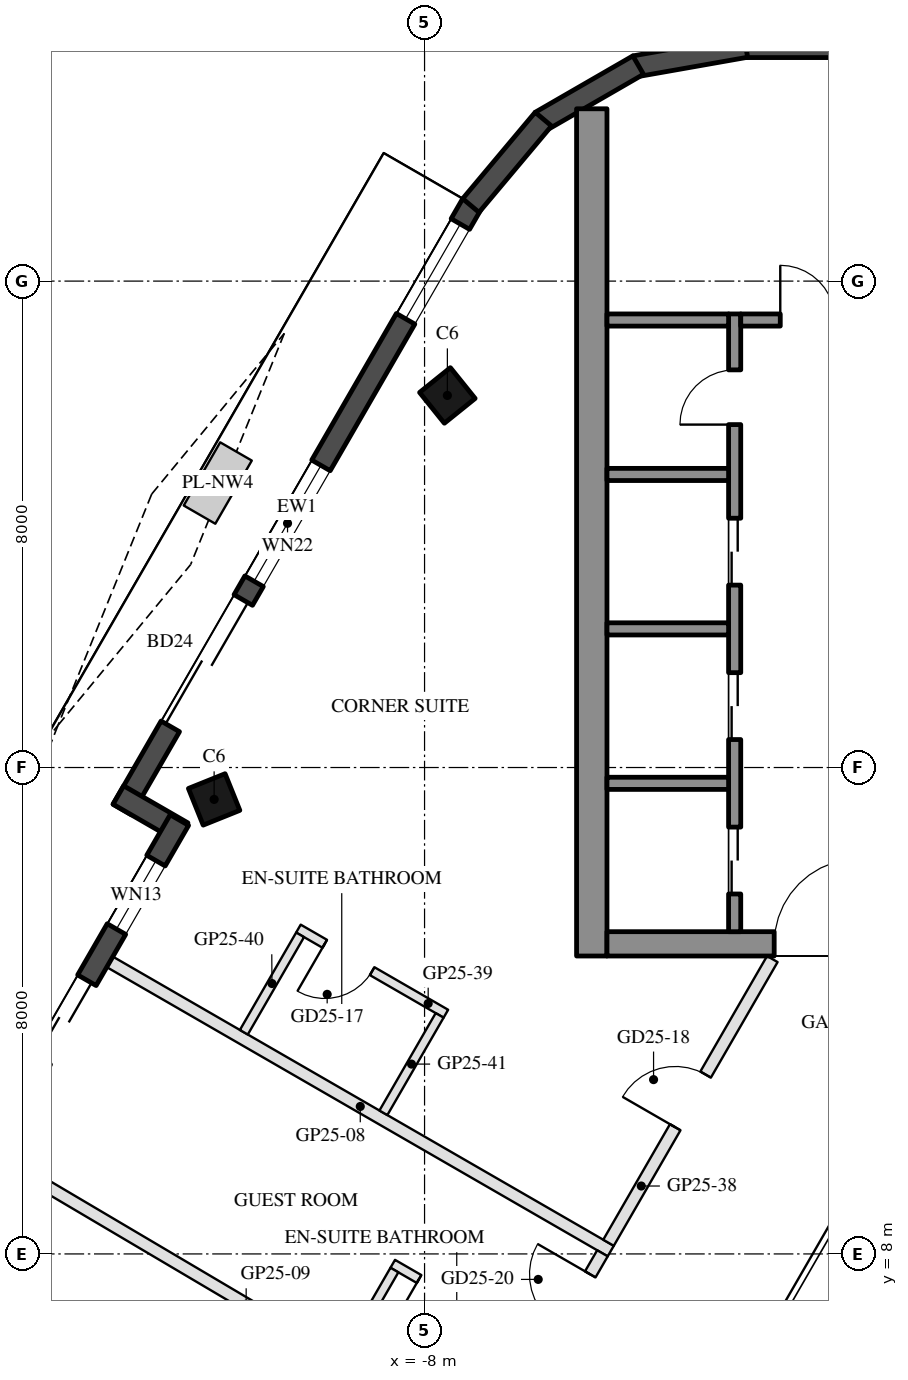
"""IFC4 building model, lengths in metres.
Left out: names, types, materials, properties, quantities, classifications, styles, units other than length and angle.
Written with IfcOpenShell. Run it as: python <this file> out.ifc"""

import sys

from ifc_helpers import new_model, si_unit, direction, frame, frame_2d, origin, origin_2d, place, context, subcontext, project, spatial, rectangle, hollow_rectangle, extrude, boolean, halfspace, element, fill, save


model = new_model("IFC4")
c1 = context("Model", 3, precision=1e-05, world=origin(), true_north=direction((0.0, 1.0)))
c2 = subcontext(c1, "Body", "Model", "MODEL_VIEW")
j1 = project(units=[si_unit("LENGTHUNIT", "METRE"), si_unit("PLANEANGLEUNIT", "RADIAN")], contexts=[c1])
p1 = place(None, origin())
s1 = spatial("IfcSite", under=j1, at=p1, CompositionType="ELEMENT")
p2 = place(p1, origin())
s2 = spatial("IfcBuilding", under=s1, at=p2, CompositionType="ELEMENT")
p3 = place(p2, frame((0.0, 0.0, 265.2)))
s3 = spatial("IfcBuildingStorey", under=s2, at=p3, CompositionType="ELEMENT", Elevation=265.2)
p4 = place(p3, frame((-7.625, 22.119, 0.0), z_axis=(0.069728397733, -0.180050765176, 0.981182792608), x_axis=(0.504246941598, 0.855030910201, 0.121066776982)))
e1 = element("IfcColumn", 1, at=p4, inside=s3, PredefinedType="COLUMN", context=c2, shape_type="SweptSolid", body=[
    boolean("DIFFERENCE", boolean("DIFFERENCE", extrude(hollow_rectangle(XDim=0.65, YDim=0.65, WallThickness=0.03, at=origin_2d()), origin(), (0.0, 0.0, 1.0), 3.771), halfspace(frame((0.0, 0.0, 0.047), z_axis=(0.0, 0.0, 1.0), x_axis=(1.0, 0.0, 0.0)), True)), halfspace(frame((0.0, 0.0, 3.724), z_axis=(0.0, 0.0, 1.0), x_axis=(1.0, 0.0, 0.0)), False)),
])
p5 = place(p3, frame((-11.461, 15.475, 0.0), z_axis=(0.100582464937, -0.128315882454, 0.986619583252), x_axis=(0.502859866582, 0.862221844537, 0.060872369628)))
e2 = element("IfcColumn", 2, at=p5, inside=s3, PredefinedType="COLUMN", context=c2, shape_type="SweptSolid", body=[
    boolean("DIFFERENCE", boolean("DIFFERENCE", extrude(hollow_rectangle(XDim=0.65, YDim=0.65, WallThickness=0.03, at=origin_2d()), origin(), (0.0, 0.0, 1.0), 3.75), halfspace(frame((0.0, 0.0, 0.04), z_axis=(0.0, 0.0, 1.0), x_axis=(1.0, 0.0, 0.0)), True)), halfspace(frame((0.0, 0.0, 3.71), z_axis=(0.0, 0.0, 1.0), x_axis=(1.0, 0.0, 0.0)), False)),
])
p6 = place(p3, frame((-7.221, 25.268, 0.0), z_axis=(0.0, 0.0, 1.0), x_axis=(-0.499999932627, -0.866025442683, 0.0)))
e3 = element("IfcWall", 3, at=p6, inside=s3, PredefinedType="SOLIDWALL", context=c2, shape_type="SweptSolid", body=[
    extrude(rectangle(XDim=11.5, YDim=0.35, at=frame_2d((5.75, 0.0))), origin(), (0.0, 0.0, 1.0), 3.55),
])
p7 = place(p6, frame((0.381, 0.0, 0.3)))
e4 = element("IfcOpeningElement", 4, at=p7, cuts=e3, PredefinedType="OPENING", context=c2, shape_type="SweptSolid", body=[
    extrude(rectangle(XDim=1.8, YDim=2.65, at=frame_2d((0.9, 1.325))), frame((0.0, 0.185, 0.0), z_axis=(0.0, -1.0, 0.0), x_axis=(1.0, 0.0, 0.0)), (0.0, 0.0, 1.0), 0.37),
])
p8 = place(p6, frame((7.521, 0.0, 0.0)))
e5 = element("IfcOpeningElement", 5, at=p8, cuts=e3, PredefinedType="OPENING", context=c2, shape_type="SweptSolid", body=[
    extrude(rectangle(XDim=2.4, YDim=2.4, at=frame_2d((1.2, 1.2))), frame((0.0, 0.185, 0.0), z_axis=(0.0, -1.0, 0.0), x_axis=(1.0, 0.0, 0.0)), (0.0, 0.0, 1.0), 0.37),
])
p9 = place(p6, frame((4.964, 0.0, 0.3)))
e6 = element("IfcOpeningElement", 6, at=p9, cuts=e3, PredefinedType="OPENING", context=c2, shape_type="SweptSolid", body=[
    extrude(rectangle(XDim=2.2, YDim=2.65, at=frame_2d((1.1, 1.325))), frame((0.0, 0.185, 0.0), z_axis=(0.0, -1.0, 0.0), x_axis=(1.0, 0.0, 0.0)), (0.0, 0.0, 1.0), 0.37),
])
p10 = place(p3, frame((-13.036, 15.548, 0.0), z_axis=(0.0, 0.0, 1.0), x_axis=(0.866005645448, -0.500034220881, 0.0)))
e7 = element("IfcWall", 7, at=p10, inside=s3, PredefinedType="SOLIDWALL", context=c2, shape_type="SweptSolid", body=[
    extrude(rectangle(XDim=1.22, YDim=0.35, at=frame_2d((0.61, 0.0))), origin(), (0.0, 0.0, 1.0), 3.55),
])
p11 = place(p3, frame((-12.032, 15.136, 0.0), z_axis=(0.0, 0.0, 1.0), x_axis=(-0.500005870429, -0.866022014464, 0.0)))
e8 = element("IfcWall", 8, at=p11, inside=s3, PredefinedType="SOLIDWALL", context=c2, shape_type="SweptSolid", body=[
    extrude(rectangle(XDim=6.512, YDim=0.35, at=frame_2d((3.256, 0.0))), origin(), (0.0, 0.0, 1.0), 3.55),
])
p12 = place(p11, frame((0.77, 0.0, 0.3)))
e9 = element("IfcOpeningElement", 9, at=p12, cuts=e8, PredefinedType="OPENING", context=c2, shape_type="SweptSolid", body=[
    extrude(rectangle(XDim=1.3, YDim=2.65, at=frame_2d((0.65, 1.325))), frame((0.0, 0.185, 0.0), z_axis=(0.0, -1.0, 0.0), x_axis=(1.0, 0.0, 0.0)), (0.0, 0.0, 1.0), 0.37),
])
p13 = place(p11, frame((3.042, 0.0, 0.0)))
e10 = element("IfcOpeningElement", 10, at=p13, cuts=e8, PredefinedType="OPENING", context=c2, shape_type="SweptSolid", body=[
    extrude(rectangle(XDim=1.5, YDim=2.4, at=frame_2d((0.75, 1.2))), frame((0.0, 0.185, 0.0), z_axis=(0.0, -1.0, 0.0), x_axis=(1.0, 0.0, 0.0)), (0.0, 0.0, 1.0), 0.37),
])
p14 = place(p11, frame((4.842, 0.0, 0.3)))
e11 = element("IfcOpeningElement", 11, at=p14, cuts=e8, PredefinedType="OPENING", context=c2, shape_type="SweptSolid", body=[
    extrude(rectangle(XDim=1.0, YDim=2.65, at=frame_2d((0.5, 1.325))), frame((0.0, 0.185, 0.0), z_axis=(0.0, -1.0, 0.0), x_axis=(1.0, 0.0, 0.0)), (0.0, 0.0, 1.0), 0.37),
])
p15 = place(p3, frame((2.747, 27.851, 0.0), z_axis=(0.0, 0.0, 1.0), x_axis=(-1.0, 0.0, 0.0)))
e12 = element("IfcWall", 12, at=p15, inside=s3, PredefinedType="SOLIDWALL", context=c2, shape_type="SweptSolid", body=[
    extrude(rectangle(XDim=5.495, YDim=0.35, at=frame_2d((2.747, 0.0))), origin(), (0.0, 0.0, 1.0), 3.55),
])
p16 = place(p3, frame((-2.717, 27.854, 0.0), z_axis=(0.0, 0.0, 1.0), x_axis=(-0.984795480386, -0.173717764815, 0.0)))
e13 = element("IfcWall", 13, at=p16, inside=s3, PredefinedType="SOLIDWALL", context=c2, shape_type="SweptSolid", body=[
    extrude(rectangle(XDim=1.855, YDim=0.35, at=frame_2d((0.928, 0.0))), origin(), (0.0, 0.0, 1.0), 3.55),
])
p17 = place(p3, frame((-4.487, 27.552, 0.0), z_axis=(0.0, 0.0, 1.0), x_axis=(-0.866080385203, -0.499904757295, 0.0)))
e14 = element("IfcWall", 14, at=p17, inside=s3, PredefinedType="SOLIDWALL", context=c2, shape_type="SweptSolid", body=[
    extrude(rectangle(XDim=1.855, YDim=0.35, at=frame_2d((0.927, 0.0))), origin(), (0.0, 0.0, 1.0), 3.55),
])
p18 = place(p3, frame((-6.046, 26.664, 0.0), z_axis=(0.0, 0.0, 1.0), x_axis=(-0.642756798522, -0.7660702957, 0.0)))
e15 = element("IfcWall", 15, at=p18, inside=s3, PredefinedType="SOLIDWALL", context=c2, shape_type="SweptSolid", body=[
    extrude(rectangle(XDim=1.855, YDim=0.35, at=frame_2d((0.928, 0.0))), origin(), (0.0, 0.0, 1.0), 3.55),
])
p19 = place(p3, frame((-5.25, 12.9, 0.0), z_axis=(0.0, 0.0, 1.0), x_axis=(0.0, 1.0, 0.0)))
e16 = element("IfcWall", 16, at=p19, inside=s3, PredefinedType="SHEAR", context=c2, shape_type="SweptSolid", body=[
    extrude(rectangle(XDim=13.934, YDim=0.5, at=frame_2d((6.967, 0.0))), origin(), (0.0, 0.0, 1.0), 3.5),
])
p20 = place(p3, frame((5.0, 13.1, 0.0), z_axis=(0.0, 0.0, 1.0), x_axis=(-1.0, 0.0, 0.0)))
e17 = element("IfcWall", 17, at=p20, inside=s3, PredefinedType="SHEAR", context=c2, shape_type="SweptSolid", body=[
    extrude(rectangle(XDim=10.0, YDim=0.4, at=frame_2d((5.0, 0.0))), origin(), (0.0, 0.0, 1.0), 3.5),
])
p21 = place(p20, frame((3.55, 0.0, 0.0)))
e18 = element("IfcOpeningElement", 18, at=p21, cuts=e17, PredefinedType="OPENING", context=c2, shape_type="SweptSolid", body=[
    extrude(rectangle(XDim=1.1, YDim=2.1, at=frame_2d((0.55, 1.05))), frame((0.0, 0.21, 0.0), z_axis=(0.0, -1.0, 0.0), x_axis=(1.0, 0.0, 0.0)), (0.0, 0.0, 1.0), 0.42),
])
p22 = place(p20, frame((5.85, 0.0, 0.0)))
e19 = element("IfcOpeningElement", 19, at=p22, cuts=e17, PredefinedType="OPENING", context=c2, shape_type="SweptSolid", body=[
    extrude(rectangle(XDim=1.4, YDim=2.1, at=frame_2d((0.7, 1.05))), frame((0.0, 0.21, 0.0), z_axis=(0.0, -1.0, 0.0), x_axis=(1.0, 0.0, 0.0)), (0.0, 0.0, 1.0), 0.42),
])
p23 = place(p3, frame((-2.9, 13.3, 0.0), z_axis=(0.0, 0.0, 1.0), x_axis=(0.0, 1.0, 0.0)))
e20 = element("IfcWall", 20, at=p23, inside=s3, PredefinedType="SHEAR", context=c2, shape_type="SweptSolid", body=[
    extrude(rectangle(XDim=10.16, YDim=0.2, at=frame_2d((5.08, 0.0))), origin(), (0.0, 0.0, 1.0), 3.5),
])
p24 = place(p23, frame((0.62, 0.0, 0.0)))
e21 = element("IfcOpeningElement", 21, at=p24, cuts=e20, PredefinedType="OPENING", context=c2, shape_type="SweptSolid", body=[
    extrude(rectangle(XDim=1.1, YDim=2.1, at=frame_2d((0.55, 1.05))), frame((0.0, 0.11, 0.0), z_axis=(0.0, -1.0, 0.0), x_axis=(1.0, 0.0, 0.0)), (0.0, 0.0, 1.0), 0.22),
])
p25 = place(p23, frame((3.16, 0.0, 0.0)))
e22 = element("IfcOpeningElement", 22, at=p25, cuts=e20, PredefinedType="OPENING", context=c2, shape_type="SweptSolid", body=[
    extrude(rectangle(XDim=1.1, YDim=2.1, at=frame_2d((0.55, 1.05))), frame((0.0, 0.11, 0.0), z_axis=(0.0, -1.0, 0.0), x_axis=(1.0, 0.0, 0.0)), (0.0, 0.0, 1.0), 0.22),
])
p26 = place(p23, frame((5.7, 0.0, 0.0)))
e23 = element("IfcOpeningElement", 23, at=p26, cuts=e20, PredefinedType="OPENING", context=c2, shape_type="SweptSolid", body=[
    extrude(rectangle(XDim=1.1, YDim=2.1, at=frame_2d((0.55, 1.05))), frame((0.0, 0.11, 0.0), z_axis=(0.0, -1.0, 0.0), x_axis=(1.0, 0.0, 0.0)), (0.0, 0.0, 1.0), 0.22),
])
p27 = place(p23, frame((8.34, 0.0, 0.0)))
e24 = element("IfcOpeningElement", 24, at=p27, cuts=e20, PredefinedType="OPENING", context=c2, shape_type="SweptSolid", body=[
    extrude(rectangle(XDim=0.9, YDim=2.1, at=frame_2d((0.45, 1.05))), frame((0.0, 0.11, 0.0), z_axis=(0.0, -1.0, 0.0), x_axis=(1.0, 0.0, 0.0)), (0.0, 0.0, 1.0), 0.22),
])
p28 = place(p3, frame((-0.4, 23.36, 0.0), z_axis=(0.0, 0.0, 1.0), x_axis=(-1.0, 0.0, 0.0)))
e25 = element("IfcWall", 25, at=p28, inside=s3, PredefinedType="SHEAR", context=c2, shape_type="SweptSolid", body=[
    extrude(rectangle(XDim=2.4, YDim=0.2, at=frame_2d((1.2, 0.0))), origin(), (0.0, 0.0, 1.0), 3.5),
])
p29 = place(p28, frame((0.85, 0.0, 0.0)))
e26 = element("IfcOpeningElement", 26, at=p29, cuts=e25, PredefinedType="OPENING", context=c2, shape_type="SweptSolid", body=[
    extrude(rectangle(XDim=0.9, YDim=2.1, at=frame_2d((0.45, 1.05))), frame((0.0, 0.11, 0.0), z_axis=(0.0, -1.0, 0.0), x_axis=(1.0, 0.0, 0.0)), (0.0, 0.0, 1.0), 0.22),
])
for number, where, z_axis, x_axis in (
    (27, (-3.0, 15.74, 0.0), (0.0, 0.0, 1.0), (-1.0, 0.0, 0.0)),
    (28, (-3.0, 18.28, 0.0), (0.0, 0.0, 1.0), (-1.0, 0.0, 0.0)),
    (29, (-3.0, 20.82, 0.0), (0.0, 0.0, 1.0), (-1.0, 0.0, 0.0)),
    (30, (-3.0, 23.36, 0.0), (0.0, 0.0, 1.0), (-1.0, 0.0, 0.0)),
):
    element("IfcWall", number, at=place(p3, frame(where, z_axis=z_axis, x_axis=x_axis)), inside=s3, PredefinedType="SHEAR", context=c2, shape_type="SweptSolid", body=[
        extrude(rectangle(XDim=2.0, YDim=0.2, at=frame_2d((1.0, 0.0))), origin(), (0.0, 0.0, 1.0), 3.5),
    ])
p30 = place(p3, frame((-13.177, 12.804, 0.0), z_axis=(0.0, 0.0, 1.0), x_axis=(0.866021901412, -0.500006066238, 0.0)))
e31 = element("IfcWall", 31, at=p30, inside=s3, PredefinedType="PARTITIONING", context=c2, shape_type="SweptSolid", body=[
    extrude(rectangle(XDim=9.513, YDim=0.2, at=frame_2d((4.757, 0.0))), origin(), (0.0, 0.0, 1.0), 3.1),
])
p31 = place(p3, frame((-15.029, 9.596, 0.0), z_axis=(0.0, 0.0, 1.0), x_axis=(0.860830464323, -0.508891846754, 0.0)))
e32 = element("IfcWall", 32, at=p31, inside=s3, PredefinedType="PARTITIONING", context=c2, shape_type="SweptSolid", body=[
    extrude(rectangle(XDim=9.513, YDim=0.2, at=frame_2d((4.757, 0.0))), origin(), (0.0, 0.0, 1.0), 3.1),
])
p32 = place(p3, frame((-4.975, 8.184, 0.0), z_axis=(0.0, 0.0, 1.0), x_axis=(0.499983925036, 0.86603468447, 0.0)))
e33 = element("IfcWall", 33, at=p32, inside=s3, PredefinedType="PARTITIONING", context=c2, shape_type="SweptSolid", body=[
    extrude(rectangle(XDim=5.388, YDim=0.2, at=frame_2d((2.694, 0.0))), origin(), (0.0, 0.0, 1.0), 3.0),
])
p33 = place(p32, frame((2.194, 0.0, 0.0)))
e34 = element("IfcOpeningElement", 34, at=p33, cuts=e33, PredefinedType="OPENING", context=c2, shape_type="SweptSolid", body=[
    extrude(rectangle(XDim=1.0, YDim=2.1, at=frame_2d((0.5, 1.05))), frame((0.0, 0.11, 0.0), z_axis=(0.0, -1.0, 0.0), x_axis=(1.0, 0.0, 0.0)), (0.0, 0.0, 1.0), 0.22),
])
p34 = place(p3, frame((-7.649, 11.951, 0.0), z_axis=(0.0, 0.0, 1.0), x_axis=(-0.865996816683, 0.500049511043, 0.0)))
e35 = element("IfcWall", 35, at=p34, inside=s3, PredefinedType="PARTITIONING", context=c2, shape_type="SweptSolid", body=[
    extrude(rectangle(XDim=2.8, YDim=0.15, at=frame_2d((1.4, 0.0))), origin(), (0.0, 0.0, 1.0), 3.55),
])
p35 = place(p34, frame((1.4, 0.0, 0.0)))
e36 = element("IfcOpeningElement", 36, at=p35, cuts=e35, PredefinedType="OPENING", context=c2, shape_type="SweptSolid", body=[
    extrude(rectangle(XDim=0.9, YDim=2.1, at=frame_2d((0.45, 1.05))), frame((0.0, 0.085, 0.0), z_axis=(0.0, -1.0, 0.0), x_axis=(1.0, 0.0, 0.0)), (0.0, 0.0, 1.0), 0.17),
])
for number, where, z_axis, x_axis in (
    (37, (-10.047, 13.248, 0.0), (0.0, 0.0, 1.0), (-0.5, -0.866, 0.0)),
    (38, (-7.752, 11.923, 0.0), (0.0, 0.0, 1.0), (-0.5, -0.866, 0.0)),
):
    element("IfcWall", number, at=place(p3, frame(where, z_axis=z_axis, x_axis=x_axis)), inside=s3, PredefinedType="PARTITIONING", context=c2, shape_type="SweptSolid", body=[
        extrude(rectangle(XDim=1.85, YDim=0.15, at=frame_2d((0.925, 0.0))), origin(), (0.0, 0.0, 1.0), 3.55),
    ])
p36 = place(p3, frame((-6.875, 4.892, 0.0), z_axis=(0.0, 0.0, 1.0), x_axis=(0.499945471869, 0.866056883327, 0.0)))
e39 = element("IfcWall", 39, at=p36, inside=s3, PredefinedType="PARTITIONING", context=c2, shape_type="SweptSolid", body=[
    extrude(rectangle(XDim=3.601, YDim=0.2, at=frame_2d((1.801, 0.0))), origin(), (0.0, 0.0, 1.0), 3.0),
])
p37 = place(p36, frame((2.201, 0.0, 0.0)))
e40 = element("IfcOpeningElement", 40, at=p37, cuts=e39, PredefinedType="OPENING", context=c2, shape_type="SweptSolid", body=[
    extrude(rectangle(XDim=1.0, YDim=2.1, at=frame_2d((0.5, 1.05))), frame((0.0, 0.11, 0.0), z_axis=(0.0, -1.0, 0.0), x_axis=(1.0, 0.0, 0.0)), (0.0, 0.0, 1.0), 0.22),
])
p38 = place(p3, frame((-6.098, 6.438, 0.0), z_axis=(0.0, 0.0, 1.0), x_axis=(-0.866018616679, 0.500011755427, 0.0)))
e41 = element("IfcWall", 41, at=p38, inside=s3, PredefinedType="PARTITIONING", context=c2, shape_type="SweptSolid", body=[
    extrude(rectangle(XDim=2.8, YDim=0.15, at=frame_2d((1.4, 0.0))), origin(), (0.0, 0.0, 1.0), 3.55),
])
p39 = place(p38, frame((1.4, 0.0, 0.0)))
e42 = element("IfcOpeningElement", 42, at=p39, cuts=e41, PredefinedType="OPENING", context=c2, shape_type="SweptSolid", body=[
    extrude(rectangle(XDim=0.9, YDim=2.1, at=frame_2d((0.45, 1.05))), frame((0.0, 0.085, 0.0), z_axis=(0.0, -1.0, 0.0), x_axis=(1.0, 0.0, 0.0)), (0.0, 0.0, 1.0), 0.17),
])
p40 = place(p3, frame((-8.496, 7.735, 0.0), z_axis=(0.0, 0.0, 1.0), x_axis=(-0.500021943523, -0.866012734315, 0.0)))
e43 = element("IfcWall", 43, at=p40, inside=s3, PredefinedType="PARTITIONING", context=c2, shape_type="SweptSolid", body=[
    extrude(rectangle(XDim=1.623, YDim=0.15, at=frame_2d((0.812, 0.0))), origin(), (0.0, 0.0, 1.0), 3.55),
])
p41 = place(p7, origin())
e44 = element("IfcWindow", 44, at=p41, inside=s3, PartitioningType="SINGLE_PANEL", PredefinedType="WINDOW", context=c2, shape_type="SweptSolid", body=[
    extrude(rectangle(XDim=1.8, YDim=2.65, at=frame_2d((0.9, 1.325))), frame((0.0, 0.03, 0.0), z_axis=(0.0, -1.0, 0.0), x_axis=(1.0, 0.0, 0.0)), (0.0, 0.0, 1.0), 0.06),
])
fill(e4, e44)
p42 = place(p8, frame((2.4, 0.0, 0.0), z_axis=(0.0, 0.0, 1.0), x_axis=(-1.0, 0.0, 0.0)))
e45 = element("IfcDoor", 45, at=p42, inside=s3, OperationType="SLIDING_TO_LEFT", PredefinedType="DOOR", context=c2, shape_type="SweptSolid", body=[
    extrude(rectangle(XDim=2.4, YDim=2.4, at=frame_2d((1.2, 1.2))), frame((0.0, 0.025, 0.0), z_axis=(0.0, -1.0, 0.0), x_axis=(1.0, 0.0, 0.0)), (0.0, 0.0, 1.0), 0.05),
])
fill(e5, e45)
p43 = place(p9, origin())
e46 = element("IfcWindow", 46, at=p43, inside=s3, PartitioningType="SINGLE_PANEL", PredefinedType="WINDOW", context=c2, shape_type="SweptSolid", body=[
    extrude(rectangle(XDim=2.2, YDim=2.65, at=frame_2d((1.1, 1.325))), frame((0.0, 0.03, 0.0), z_axis=(0.0, -1.0, 0.0), x_axis=(1.0, 0.0, 0.0)), (0.0, 0.0, 1.0), 0.06),
])
fill(e6, e46)
p44 = place(p12, origin())
e47 = element("IfcWindow", 47, at=p44, inside=s3, PartitioningType="SINGLE_PANEL", PredefinedType="WINDOW", context=c2, shape_type="SweptSolid", body=[
    extrude(rectangle(XDim=1.3, YDim=2.65, at=frame_2d((0.65, 1.325))), frame((0.0, 0.03, 0.0), z_axis=(0.0, -1.0, 0.0), x_axis=(1.0, 0.0, 0.0)), (0.0, 0.0, 1.0), 0.06),
])
fill(e9, e47)
p45 = place(p13, frame((1.5, 0.0, 0.0), z_axis=(0.0, 0.0, 1.0), x_axis=(-1.0, 0.0, 0.0)))
e48 = element("IfcDoor", 48, at=p45, inside=s3, OperationType="SLIDING_TO_LEFT", PredefinedType="DOOR", context=c2, shape_type="SweptSolid", body=[
    extrude(rectangle(XDim=1.5, YDim=2.4, at=frame_2d((0.75, 1.2))), frame((0.0, 0.025, 0.0), z_axis=(0.0, -1.0, 0.0), x_axis=(1.0, 0.0, 0.0)), (0.0, 0.0, 1.0), 0.05),
])
fill(e10, e48)
p46 = place(p24, origin())
e49 = element("IfcDoor", 49, at=p46, inside=s3, OperationType="DOUBLE_DOOR_SLIDING", PredefinedType="DOOR", context=c2, shape_type="SweptSolid", body=[
    extrude(rectangle(XDim=1.1, YDim=2.1, at=frame_2d((0.55, 1.05))), frame((0.0, 0.025, 0.0), z_axis=(0.0, -1.0, 0.0), x_axis=(1.0, 0.0, 0.0)), (0.0, 0.0, 1.0), 0.05),
])
fill(e21, e49)
p47 = place(p25, origin())
e50 = element("IfcDoor", 50, at=p47, inside=s3, OperationType="DOUBLE_DOOR_SLIDING", PredefinedType="DOOR", context=c2, shape_type="SweptSolid", body=[
    extrude(rectangle(XDim=1.1, YDim=2.1, at=frame_2d((0.55, 1.05))), frame((0.0, 0.025, 0.0), z_axis=(0.0, -1.0, 0.0), x_axis=(1.0, 0.0, 0.0)), (0.0, 0.0, 1.0), 0.05),
])
fill(e22, e50)
p48 = place(p26, origin())
e51 = element("IfcDoor", 51, at=p48, inside=s3, OperationType="DOUBLE_DOOR_SLIDING", PredefinedType="DOOR", context=c2, shape_type="SweptSolid", body=[
    extrude(rectangle(XDim=1.1, YDim=2.1, at=frame_2d((0.55, 1.05))), frame((0.0, 0.025, 0.0), z_axis=(0.0, -1.0, 0.0), x_axis=(1.0, 0.0, 0.0)), (0.0, 0.0, 1.0), 0.05),
])
fill(e23, e51)
p49 = place(p27, origin())
e52 = element("IfcDoor", 52, at=p49, inside=s3, OperationType="SINGLE_SWING_LEFT", PredefinedType="DOOR", context=c2, shape_type="SweptSolid", body=[
    extrude(rectangle(XDim=0.9, YDim=2.1, at=frame_2d((0.45, 1.05))), frame((0.0, 0.025, 0.0), z_axis=(0.0, -1.0, 0.0), x_axis=(1.0, 0.0, 0.0)), (0.0, 0.0, 1.0), 0.05),
])
fill(e24, e52)
p50 = place(p29, frame((0.9, 0.0, 0.0), z_axis=(0.0, 0.0, 1.0), x_axis=(-1.0, 0.0, 0.0)))
e53 = element("IfcDoor", 53, at=p50, inside=s3, OperationType="SINGLE_SWING_LEFT", PredefinedType="DOOR", context=c2, shape_type="SweptSolid", body=[
    extrude(rectangle(XDim=0.9, YDim=2.1, at=frame_2d((0.45, 1.05))), frame((0.0, 0.025, 0.0), z_axis=(0.0, -1.0, 0.0), x_axis=(1.0, 0.0, 0.0)), (0.0, 0.0, 1.0), 0.05),
])
fill(e26, e53)
p51 = place(p22, frame((1.4, 0.0, 0.0), z_axis=(0.0, 0.0, 1.0), x_axis=(-1.0, 0.0, 0.0)))
e54 = element("IfcDoor", 54, at=p51, inside=s3, OperationType="DOUBLE_DOOR_SINGLE_SWING", PredefinedType="DOOR", context=c2, shape_type="SweptSolid", body=[
    extrude(rectangle(XDim=1.4, YDim=2.1, at=frame_2d((0.7, 1.05))), frame((0.0, 0.025, 0.0), z_axis=(0.0, -1.0, 0.0), x_axis=(1.0, 0.0, 0.0)), (0.0, 0.0, 1.0), 0.05),
])
fill(e19, e54)
p52 = place(p35, origin())
e55 = element("IfcDoor", 55, at=p52, inside=s3, OperationType="SINGLE_SWING_RIGHT", PredefinedType="DOOR", context=c2, shape_type="SweptSolid", body=[
    extrude(rectangle(XDim=0.9, YDim=2.1, at=frame_2d((0.45, 1.05))), frame((0.0, 0.025, 0.0), z_axis=(0.0, -1.0, 0.0), x_axis=(1.0, 0.0, 0.0)), (0.0, 0.0, 1.0), 0.05),
])
fill(e36, e55)
p53 = place(p33, origin())
e56 = element("IfcDoor", 56, at=p53, inside=s3, OperationType="SINGLE_SWING_LEFT", PredefinedType="DOOR", context=c2, shape_type="SweptSolid", body=[
    extrude(rectangle(XDim=1.0, YDim=2.1, at=frame_2d((0.5, 1.05))), frame((0.0, 0.025, 0.0), z_axis=(0.0, -1.0, 0.0), x_axis=(1.0, 0.0, 0.0)), (0.0, 0.0, 1.0), 0.05),
])
fill(e34, e56)
p54 = place(p39, origin())
e57 = element("IfcDoor", 57, at=p54, inside=s3, OperationType="SINGLE_SWING_RIGHT", PredefinedType="DOOR", context=c2, shape_type="SweptSolid", body=[
    extrude(rectangle(XDim=0.9, YDim=2.1, at=frame_2d((0.45, 1.05))), frame((0.0, 0.025, 0.0), z_axis=(0.0, -1.0, 0.0), x_axis=(1.0, 0.0, 0.0)), (0.0, 0.0, 1.0), 0.05),
])
fill(e42, e57)
p55 = place(p37, origin())
e58 = element("IfcDoor", 58, at=p55, inside=s3, OperationType="SINGLE_SWING_RIGHT", PredefinedType="DOOR", context=c2, shape_type="SweptSolid", body=[
    extrude(rectangle(XDim=1.0, YDim=2.1, at=frame_2d((0.5, 1.05))), frame((0.0, 0.025, 0.0), z_axis=(0.0, -1.0, 0.0), x_axis=(1.0, 0.0, 0.0)), (0.0, 0.0, 1.0), 0.05),
])
fill(e40, e58)
save(model, sys.argv[1])
